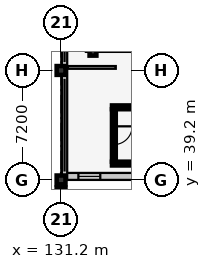
"""IFC4 building model, lengths in metres.
Left out: names, types, materials, properties, quantities, classifications, styles, units other than length and angle.
Written with IfcOpenShell. Run it as: python <this file> out.ifc"""

import sys

from ifc_helpers import new_model, si_unit, direction, frame, frame_2d, origin, origin_2d, place, context, subcontext, project, spatial, rectangle, extrude, element, fill, save


model = new_model("IFC4")
c1 = context("Model", 3, precision=1e-05, world=origin(), true_north=direction((0.0, 1.0)))
c2 = subcontext(c1, "Body", "Model", "MODEL_VIEW")
j1 = project(units=[si_unit("LENGTHUNIT", "METRE"), si_unit("PLANEANGLEUNIT", "RADIAN")], contexts=[c1])
p1 = place(None, origin())
s1 = spatial("IfcSite", under=j1, at=p1, CompositionType="ELEMENT")
p2 = place(p1, origin())
s2 = spatial("IfcBuilding", under=s1, at=p2, CompositionType="ELEMENT")
p3 = place(p2, origin())
s3 = spatial("IfcBuildingStorey", under=s2, at=p3, CompositionType="ELEMENT", Elevation=0.0)
for number, where, z_axis, x_axis in (
    (1, (131.2, 38.4, 0.0), (0.0, 0.0, 1.0), (1.0, 0.0, 0.0)),
    (2, (131.2, 39.2, 0.0), (0.0, 0.0, 1.0), (1.0, 0.0, 0.0)),
    (3, (131.2, 46.4, 0.0), (0.0, 0.0, 1.0), (1.0, 0.0, 0.0)),
):
    element("IfcColumn", number, at=place(p3, frame(where, z_axis=z_axis, x_axis=x_axis)), inside=s3, PredefinedType="COLUMN", context=c2, shape_type="SweptSolid", body=[
        extrude(rectangle(XDim=0.58, YDim=0.58, at=origin_2d()), origin(), (0.0, 0.0, 1.0), 5.4),
    ])
p4 = place(p3, frame((133.3, 47.6, -0.55), z_axis=(0.0, 0.0, 1.0), x_axis=(1.0, 0.0, 0.0)))
e4 = element("IfcColumn", 4, at=p4, inside=s3, PredefinedType="COLUMN", context=c2, shape_type="SweptSolid", body=[
    extrude(rectangle(XDim=0.45, YDim=0.45, at=origin_2d()), origin(), (0.0, 0.0, 1.0), 0.985),
])
p5 = place(p3, frame((168.4, 39.43, 0.0), z_axis=(0.0, 0.0, 1.0), x_axis=(-1.0, 0.0, 0.0)))
e5 = element("IfcWall", 5, at=p5, inside=s3, PredefinedType="SOLIDWALL", context=c2, shape_type="SweptSolid", body=[
    extrude(rectangle(XDim=37.2, YDim=0.46, at=frame_2d((18.6, 0.0))), origin(), (0.0, 0.0, 1.0), 4.315),
])
p6 = place(p5, frame((1.335, 0.0, 0.9)))
e6 = element("IfcOpeningElement", 6, at=p6, cuts=e5, PredefinedType="OPENING", context=c2, shape_type="SweptSolid", body=[
    extrude(rectangle(XDim=1.05, YDim=1.6, at=frame_2d((0.525, 0.8))), frame((0.0, 0.242, 0.0), z_axis=(0.0, -1.0, 0.0), x_axis=(1.0, 0.0, 0.0)), (0.0, 0.0, 1.0), 0.484),
])
p7 = place(p5, frame((5.005, 0.0, 0.9)))
e7 = element("IfcOpeningElement", 7, at=p7, cuts=e5, PredefinedType="OPENING", context=c2, shape_type="SweptSolid", body=[
    extrude(rectangle(XDim=1.15, YDim=1.6, at=frame_2d((0.575, 0.8))), frame((0.0, 0.242, 0.0), z_axis=(0.0, -1.0, 0.0), x_axis=(1.0, 0.0, 0.0)), (0.0, 0.0, 1.0), 0.484),
])
p8 = place(p5, frame((12.33, 0.0, 0.9)))
e8 = element("IfcOpeningElement", 8, at=p8, cuts=e5, PredefinedType="OPENING", context=c2, shape_type="SweptSolid", body=[
    extrude(rectangle(XDim=1.38, YDim=1.6, at=frame_2d((0.69, 0.8))), frame((0.0, 0.242, 0.0), z_axis=(0.0, -1.0, 0.0), x_axis=(1.0, 0.0, 0.0)), (0.0, 0.0, 1.0), 0.484),
])
p9 = place(p5, frame((19.96, 0.0, 0.9)))
e9 = element("IfcOpeningElement", 9, at=p9, cuts=e5, PredefinedType="OPENING", context=c2, shape_type="SweptSolid", body=[
    extrude(rectangle(XDim=1.0, YDim=1.75, at=frame_2d((0.5, 0.875))), frame((0.0, 0.242, 0.0), z_axis=(0.0, -1.0, 0.0), x_axis=(1.0, 0.0, 0.0)), (0.0, 0.0, 1.0), 0.484),
])
p10 = place(p5, frame((27.28, 0.0, 0.9)))
e10 = element("IfcOpeningElement", 10, at=p10, cuts=e5, PredefinedType="OPENING", context=c2, shape_type="SweptSolid", body=[
    extrude(rectangle(XDim=1.24, YDim=1.75, at=frame_2d((0.62, 0.875))), frame((0.0, 0.242, 0.0), z_axis=(0.0, -1.0, 0.0), x_axis=(1.0, 0.0, 0.0)), (0.0, 0.0, 1.0), 0.484),
])
p11 = place(p5, frame((30.95, 0.0, 0.9)))
e11 = element("IfcOpeningElement", 11, at=p11, cuts=e5, PredefinedType="OPENING", context=c2, shape_type="SweptSolid", body=[
    extrude(rectangle(XDim=1.34, YDim=1.75, at=frame_2d((0.67, 0.875))), frame((0.0, 0.242, 0.0), z_axis=(0.0, -1.0, 0.0), x_axis=(1.0, 0.0, 0.0)), (0.0, 0.0, 1.0), 0.484),
])
p12 = place(p5, frame((34.62, 0.0, 0.9)))
e12 = element("IfcOpeningElement", 12, at=p12, cuts=e5, PredefinedType="OPENING", context=c2, shape_type="SweptSolid", body=[
    extrude(rectangle(XDim=1.44, YDim=1.75, at=frame_2d((0.72, 0.875))), frame((0.0, 0.242, 0.0), z_axis=(0.0, -1.0, 0.0), x_axis=(1.0, 0.0, 0.0)), (0.0, 0.0, 1.0), 0.484),
])
p13 = place(p3, frame((131.43, 39.2, 0.0), z_axis=(0.0, 0.0, 1.0), x_axis=(0.0, 1.0, 0.0)))
e13 = element("IfcWall", 13, at=p13, inside=s3, PredefinedType="SOLIDWALL", context=c2, shape_type="SweptSolid", body=[
    extrude(rectangle(XDim=28.8, YDim=0.35, at=frame_2d((14.4, 0.0))), origin(), (0.0, 0.0, 1.0), 0.85),
])
p14 = place(p3, frame((134.55, 40.275, 0.0), z_axis=(0.0, 0.0, 1.0), x_axis=(1.0, 0.0, 0.0)))
e14 = element("IfcWall", 14, at=p14, inside=s3, PredefinedType="SHEAR", context=c2, shape_type="SweptSolid", body=[
    extrude(rectangle(XDim=9.47, YDim=0.25, at=frame_2d((4.735, 0.0))), origin(), (0.0, 0.0, 1.0), 5.16),
])
p15 = place(p3, frame((143.45, 43.975, 0.0), z_axis=(0.0, 0.0, 1.0), x_axis=(-1.0, 0.0, 0.0)))
e15 = element("IfcWall", 15, at=p15, inside=s3, PredefinedType="SHEAR", context=c2, shape_type="SweptSolid", body=[
    extrude(rectangle(XDim=8.9, YDim=0.25, at=frame_2d((4.45, 0.0))), origin(), (0.0, 0.0, 1.0), 5.16),
])
p16 = place(p3, frame((134.675, 43.85, 0.0), z_axis=(0.0, 0.0, 1.0), x_axis=(0.0, -1.0, 0.0)))
e16 = element("IfcWall", 16, at=p16, inside=s3, PredefinedType="SHEAR", context=c2, shape_type="SweptSolid", body=[
    extrude(rectangle(XDim=3.45, YDim=0.25, at=frame_2d((1.725, 0.0))), origin(), (0.0, 0.0, 1.0), 5.16),
])
p17 = place(p16, frame((1.125, 0.0, 0.0)))
e17 = element("IfcOpeningElement", 17, at=p17, cuts=e16, PredefinedType="OPENING", context=c2, shape_type="SweptSolid", body=[
    extrude(rectangle(XDim=1.2, YDim=2.15, at=frame_2d((0.6, 1.075))), frame((0.0, 0.137, 0.0), z_axis=(0.0, -1.0, 0.0), x_axis=(1.0, 0.0, 0.0)), (0.0, 0.0, 1.0), 0.274),
])
p18 = place(p3, frame((131.615, 46.6, 0.0), z_axis=(0.0, 0.0, 1.0), x_axis=(1.0, 0.0, 0.0)))
e18 = element("IfcWall", 18, at=p18, inside=s3, PredefinedType="PARTITIONING", context=c2, shape_type="SweptSolid", body=[
    extrude(rectangle(XDim=3.185, YDim=0.18, at=frame_2d((1.593, 0.0))), origin(), (0.0, 0.0, 1.0), 4.285),
])
p19 = place(p12, origin())
e19 = element("IfcWindow", 19, at=p19, inside=s3, PartitioningType="SINGLE_PANEL", PredefinedType="WINDOW", context=c2, shape_type="SweptSolid", body=[
    extrude(rectangle(XDim=1.44, YDim=1.75, at=frame_2d((0.72, 0.875))), frame((0.0, 0.03, 0.0), z_axis=(0.0, -1.0, 0.0), x_axis=(1.0, 0.0, 0.0)), (0.0, 0.0, 1.0), 0.06),
])
fill(e12, e19)
p20 = place(p17, origin())
e20 = element("IfcDoor", 20, at=p20, inside=s3, OperationType="SINGLE_SWING_LEFT", PredefinedType="DOOR", context=c2, shape_type="SweptSolid", body=[
    extrude(rectangle(XDim=1.2, YDim=2.15, at=frame_2d((0.6, 1.075))), frame((0.0, 0.025, 0.0), z_axis=(0.0, -1.0, 0.0), x_axis=(1.0, 0.0, 0.0)), (0.0, 0.0, 1.0), 0.05),
])
fill(e17, e20)
save(model, sys.argv[1])
